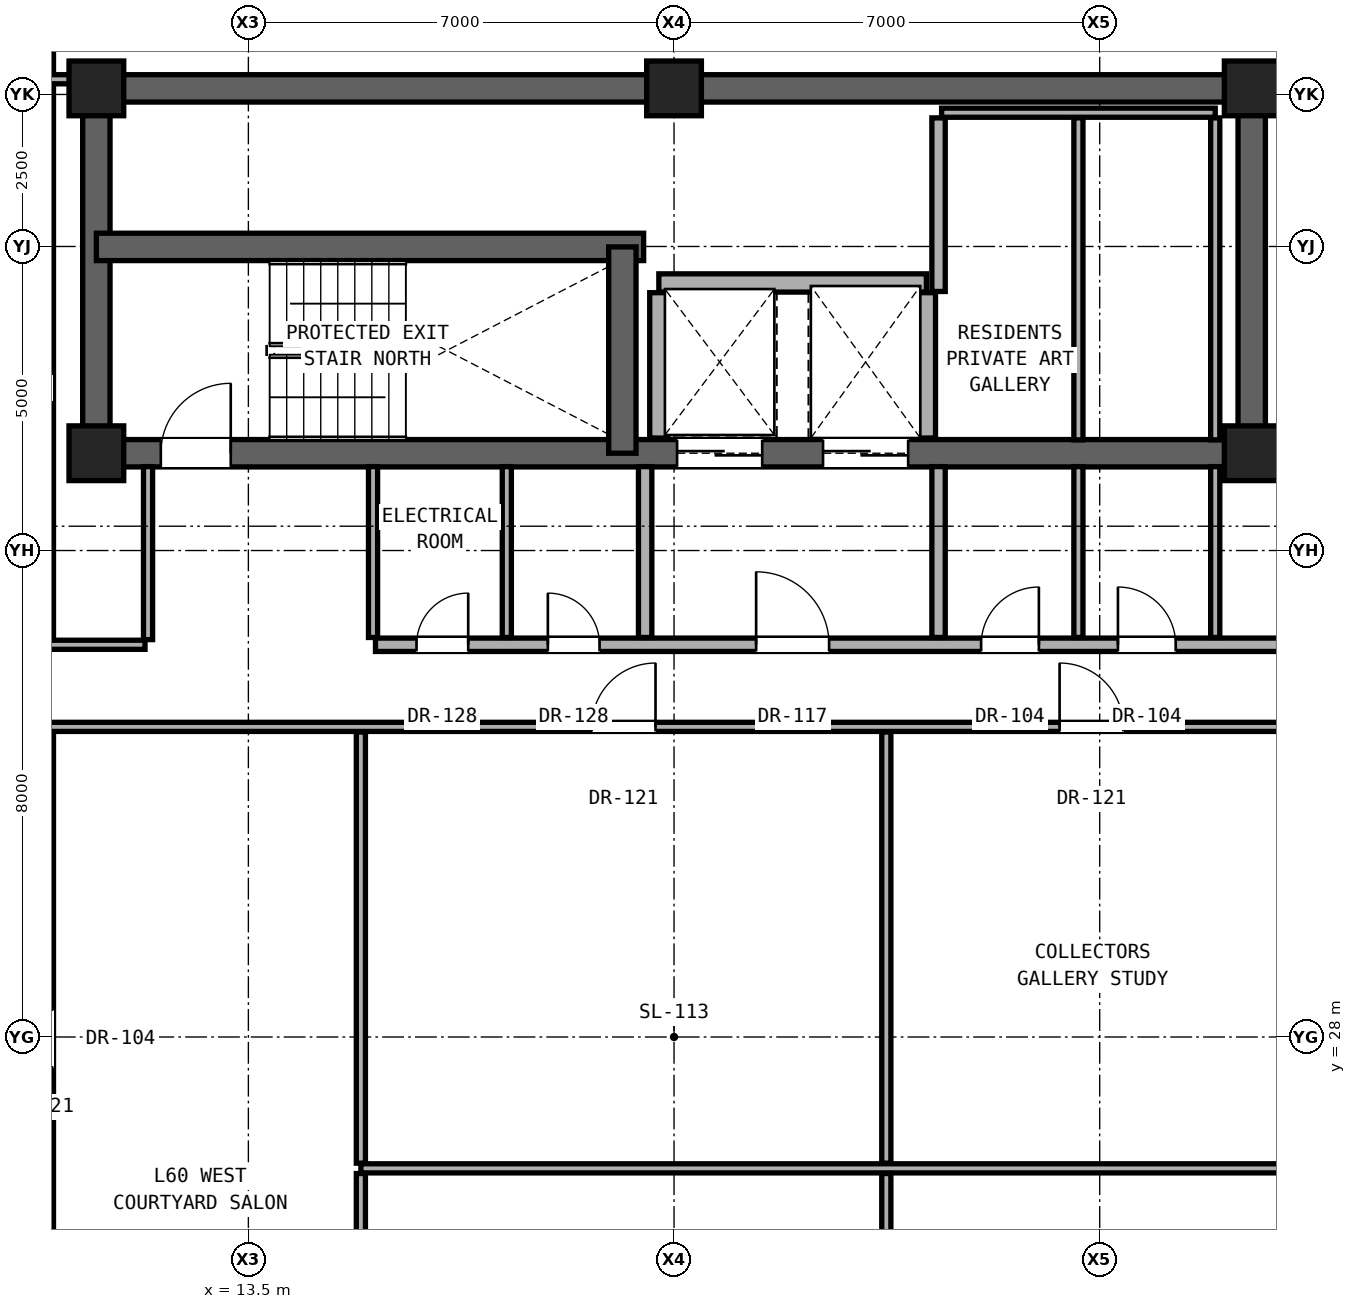
"""IFC4 building model, lengths in metres.
Left out: names, types, materials, properties, quantities, classifications, styles, units other than length and angle.
Written with IfcOpenShell. Run it as: python <this file> out.ifc"""

import sys

from ifc_helpers import new_model, si_unit, direction, frame, frame_2d, origin, origin_2d, place, context, subcontext, project, spatial, rectangle, extrude, element, fill, save


model = new_model("IFC4")
c1 = context("Model", 3, precision=1e-05, world=origin(), true_north=direction((0.0, 1.0)))
c2 = subcontext(c1, "Body", "Model", "MODEL_VIEW")
j1 = project(units=[si_unit("LENGTHUNIT", "METRE"), si_unit("PLANEANGLEUNIT", "RADIAN")], contexts=[c1])
p1 = place(None, origin())
s1 = spatial("IfcSite", under=j1, at=p1, CompositionType="ELEMENT")
p2 = place(p1, origin())
s2 = spatial("IfcBuilding", under=s1, at=p2, CompositionType="ELEMENT")
p3 = place(p2, frame((0.0, 0.0, 209.65)))
s3 = spatial("IfcBuildingStorey", under=s2, at=p3, CompositionType="ELEMENT", Elevation=209.65)
for number, where, z_axis, x_axis in (
    (1, (11.0, 37.6, 0.0), (0.0, 0.0, 1.0), (1.0, 0.0, 0.0)),
    (2, (30.0, 37.6, 0.0), (0.0, 0.0, 1.0), (1.0, 0.0, 0.0)),
    (3, (11.0, 43.6, 0.0), (0.0, 0.0, 1.0), (1.0, 0.0, 0.0)),
    (4, (20.5, 43.6, 0.0), (0.0, 0.0, 1.0), (1.0, 0.0, 0.0)),
    (5, (30.0, 43.6, 0.0), (0.0, 0.0, 1.0), (1.0, 0.0, 0.0)),
):
    element("IfcColumn", number, at=place(p3, frame(where, z_axis=z_axis, x_axis=x_axis)), inside=s3, PredefinedType="COLUMN", context=c2, shape_type="SweptSolid", body=[
        extrude(rectangle(XDim=0.9, YDim=0.9, at=origin_2d()), origin(), (0.0, 0.0, 1.0), 3.25),
    ])
p4 = place(p3, frame((11.0, 43.6, 0.0), z_axis=(0.0, 0.0, 1.0), x_axis=(1.0, 0.0, 0.0)))
e6 = element("IfcWall", 6, at=p4, inside=s3, PredefinedType="SHEAR", context=c2, shape_type="SweptSolid", body=[
    extrude(rectangle(XDim=19.0, YDim=0.45, at=frame_2d((9.5, 0.0))), origin(), (0.0, 0.0, 1.0), 2.89),
])
for number, where, z_axis, x_axis in (
    (7, (11.0, 37.6, 0.0), (0.0, 0.0, 1.0), (0.0, 1.0, 0.0)),
    (8, (30.0, 37.6, 0.0), (0.0, 0.0, 1.0), (0.0, 1.0, 0.0)),
):
    element("IfcWall", number, at=place(p3, frame(where, z_axis=z_axis, x_axis=x_axis)), inside=s3, PredefinedType="SHEAR", context=c2, shape_type="SweptSolid", body=[
        extrude(rectangle(XDim=6.0, YDim=0.45, at=frame_2d((3.0, 0.0))), origin(), (0.0, 0.0, 1.0), 2.89),
    ])
p5 = place(p3, frame((11.0, 37.6, 0.0), z_axis=(0.0, 0.0, 1.0), x_axis=(1.0, 0.0, 0.0)))
e9 = element("IfcWall", 9, at=p5, inside=s3, PredefinedType="SHEAR", context=c2, shape_type="SweptSolid", body=[
    extrude(rectangle(XDim=19.0, YDim=0.45, at=frame_2d((9.5, 0.0))), origin(), (0.0, 0.0, 1.0), 2.89),
])
p6 = place(p5, frame((1.06, 0.0, 0.0)))
e10 = element("IfcOpeningElement", 10, at=p6, cuts=e9, PredefinedType="OPENING", context=c2, shape_type="SweptSolid", body=[
    extrude(rectangle(XDim=1.15, YDim=2.2, at=frame_2d((0.575, 1.1))), frame((0.0, 0.235, 0.0), z_axis=(0.0, -1.0, 0.0), x_axis=(1.0, 0.0, 0.0)), (0.0, 0.0, 1.0), 0.47),
])
p7 = place(p5, frame((9.55, 0.0, 0.0)))
e11 = element("IfcOpeningElement", 11, at=p7, cuts=e9, PredefinedType="OPENING", context=c2, shape_type="SweptSolid", body=[
    extrude(rectangle(XDim=1.4, YDim=2.35, at=frame_2d((0.7, 1.175))), frame((0.0, 0.235, 0.0), z_axis=(0.0, -1.0, 0.0), x_axis=(1.0, 0.0, 0.0)), (0.0, 0.0, 1.0), 0.47),
])
p8 = place(p5, frame((11.95, 0.0, 0.0)))
e12 = element("IfcOpeningElement", 12, at=p8, cuts=e9, PredefinedType="OPENING", context=c2, shape_type="SweptSolid", body=[
    extrude(rectangle(XDim=1.4, YDim=2.35, at=frame_2d((0.7, 1.175))), frame((0.0, 0.235, 0.0), z_axis=(0.0, -1.0, 0.0), x_axis=(1.0, 0.0, 0.0)), (0.0, 0.0, 1.0), 0.47),
])
p9 = place(p3, frame((11.0, 40.993, 0.0), z_axis=(0.0, 0.0, 1.0), x_axis=(1.0, 0.0, 0.0)))
e13 = element("IfcWall", 13, at=p9, inside=s3, PredefinedType="SHEAR", context=c2, shape_type="SweptSolid", body=[
    extrude(rectangle(XDim=9.0, YDim=0.45, at=frame_2d((4.5, 0.0))), origin(), (0.0, 0.0, 1.0), 2.89),
])
p10 = place(p3, frame((19.65, 37.6, 0.0), z_axis=(0.0, 0.0, 1.0), x_axis=(0.0, 1.0, 0.0)))
e14 = element("IfcWall", 14, at=p10, inside=s3, PredefinedType="SHEAR", context=c2, shape_type="SweptSolid", body=[
    extrude(rectangle(XDim=3.393, YDim=0.45, at=frame_2d((1.696, 0.0))), origin(), (0.0, 0.0, 1.0), 2.89),
])
p11 = place(p3, frame((15.35, 25.84, 0.0), z_axis=(0.0, 0.0, 1.0), x_axis=(1.0, 0.0, 0.0)))
e15 = element("IfcWall", 15, at=p11, inside=s3, PredefinedType="PARTITIONING", context=c2, shape_type="SweptSolid", body=[
    extrude(rectangle(XDim=15.43, YDim=0.15, at=frame_2d((7.715, 0.0))), origin(), (0.0, 0.0, 1.0), 2.266),
])
p12 = place(p3, frame((10.22, 33.1, 0.0), z_axis=(0.0, 0.0, 1.0), x_axis=(1.0, 0.0, 0.0)))
e16 = element("IfcWall", 16, at=p12, inside=s3, PredefinedType="PARTITIONING", context=c2, shape_type="SweptSolid", body=[
    extrude(rectangle(XDim=20.56, YDim=0.15, at=frame_2d((10.28, 0.0))), origin(), (0.0, 0.0, 1.0), 2.266),
])
p13 = place(p12, frame((8.926, 0.0, 0.0)))
e17 = element("IfcOpeningElement", 17, at=p13, cuts=e16, PredefinedType="OPENING", context=c2, shape_type="SweptSolid", body=[
    extrude(rectangle(XDim=1.05, YDim=2.2, at=frame_2d((0.525, 1.1))), frame((0.0, 0.085, 0.0), z_axis=(0.0, -1.0, 0.0), x_axis=(1.0, 0.0, 0.0)), (0.0, 0.0, 1.0), 0.17),
])
p14 = place(p12, frame((16.621, 0.0, 0.0)))
e18 = element("IfcOpeningElement", 18, at=p14, cuts=e16, PredefinedType="OPENING", context=c2, shape_type="SweptSolid", body=[
    extrude(rectangle(XDim=1.05, YDim=2.2, at=frame_2d((0.525, 1.1))), frame((0.0, 0.085, 0.0), z_axis=(0.0, -1.0, 0.0), x_axis=(1.0, 0.0, 0.0)), (0.0, 0.0, 1.0), 0.17),
])
p15 = place(p3, frame((10.22, 34.45, 0.0), z_axis=(0.0, 0.0, 1.0), x_axis=(1.0, 0.0, 0.0)))
e19 = element("IfcWall", 19, at=p15, inside=s3, PredefinedType="PARTITIONING", context=c2, shape_type="SweptSolid", body=[
    extrude(rectangle(XDim=1.58, YDim=0.15, at=frame_2d((0.79, 0.0))), origin(), (0.0, 0.0, 1.0), 2.266),
])
p16 = place(p3, frame((15.59, 34.45, 0.0), z_axis=(0.0, 0.0, 1.0), x_axis=(1.0, 0.0, 0.0)))
e20 = element("IfcWall", 20, at=p16, inside=s3, PredefinedType="SOLIDWALL", context=c2, shape_type="SweptSolid", body=[
    extrude(rectangle(XDim=15.19, YDim=0.22, at=frame_2d((7.595, 0.0))), origin(), (0.0, 0.0, 1.0), 2.266),
])
p17 = place(p16, frame((6.26, 0.0, 0.0)))
e21 = element("IfcOpeningElement", 21, at=p17, cuts=e20, PredefinedType="OPENING", context=c2, shape_type="SweptSolid", body=[
    extrude(rectangle(XDim=1.2, YDim=2.25, at=frame_2d((0.6, 1.125))), frame((0.0, 0.12, 0.0), z_axis=(0.0, -1.0, 0.0), x_axis=(1.0, 0.0, 0.0)), (0.0, 0.0, 1.0), 0.24),
])
p18 = place(p16, frame((9.96, 0.0, 0.0)))
e22 = element("IfcOpeningElement", 22, at=p18, cuts=e20, PredefinedType="OPENING", context=c2, shape_type="SweptSolid", body=[
    extrude(rectangle(XDim=0.95, YDim=2.15, at=frame_2d((0.475, 1.075))), frame((0.0, 0.12, 0.0), z_axis=(0.0, -1.0, 0.0), x_axis=(1.0, 0.0, 0.0)), (0.0, 0.0, 1.0), 0.24),
])
p19 = place(p16, frame((12.21, 0.0, 0.0)))
e23 = element("IfcOpeningElement", 23, at=p19, cuts=e20, PredefinedType="OPENING", context=c2, shape_type="SweptSolid", body=[
    extrude(rectangle(XDim=0.95, YDim=2.15, at=frame_2d((0.475, 1.075))), frame((0.0, 0.12, 0.0), z_axis=(0.0, -1.0, 0.0), x_axis=(1.0, 0.0, 0.0)), (0.0, 0.0, 1.0), 0.24),
])
p20 = place(p16, frame((0.675, 0.0, 0.0)))
e24 = element("IfcOpeningElement", 24, at=p20, cuts=e20, PredefinedType="OPENING", context=c2, shape_type="SweptSolid", body=[
    extrude(rectangle(XDim=0.85, YDim=2.01, at=frame_2d((0.425, 1.005))), frame((0.0, 0.12, 0.0), z_axis=(0.0, -1.0, 0.0), x_axis=(1.0, 0.0, 0.0)), (0.0, 0.0, 1.0), 0.24),
])
p21 = place(p16, frame((2.835, 0.0, 0.0)))
e25 = element("IfcOpeningElement", 25, at=p21, cuts=e20, PredefinedType="OPENING", context=c2, shape_type="SweptSolid", body=[
    extrude(rectangle(XDim=0.85, YDim=2.01, at=frame_2d((0.425, 1.005))), frame((0.0, 0.12, 0.0), z_axis=(0.0, -1.0, 0.0), x_axis=(1.0, 0.0, 0.0)), (0.0, 0.0, 1.0), 0.24),
])
p22 = place(p3, frame((20.25, 40.4, 0.0), z_axis=(0.0, 0.0, 1.0), x_axis=(1.0, 0.0, 0.0)))
e26 = element("IfcWall", 26, at=p22, inside=s3, PredefinedType="SOLIDWALL", context=c2, shape_type="SweptSolid", body=[
    extrude(rectangle(XDim=4.4, YDim=0.3, at=frame_2d((2.2, 0.0))), origin(), (0.0, 0.0, 1.0), 2.89),
])
p23 = place(p3, frame((24.9, 43.2, 0.0), z_axis=(0.0, 0.0, 1.0), x_axis=(1.0, 0.0, 0.0)))
e27 = element("IfcWall", 27, at=p23, inside=s3, PredefinedType="PARTITIONING", context=c2, shape_type="SweptSolid", body=[
    extrude(rectangle(XDim=4.5, YDim=0.15, at=frame_2d((2.25, 0.0))), origin(), (0.0, 0.0, 1.0), 2.89),
])
for number, where, z_axis, x_axis in (
    (28, (10.22, 43.75, 0.0), (0.0, 0.0, 1.0), (1.0, 0.0, 0.0)),
    (29, (30.22, 43.75, 0.0), (0.0, 0.0, 1.0), (1.0, 0.0, 0.0)),
):
    element("IfcWall", number, at=place(p3, frame(where, z_axis=z_axis, x_axis=x_axis)), inside=s3, PredefinedType="PARTITIONING", context=c2, shape_type="SweptSolid", body=[
        extrude(rectangle(XDim=0.56, YDim=0.15, at=frame_2d((0.28, 0.0))), origin(), (0.0, 0.0, 1.0), 2.89),
    ])
p24 = place(p3, frame((10.22, 22.935, 0.0), z_axis=(0.0, 0.0, 1.0), x_axis=(0.0, 1.0, 0.0)))
e30 = element("IfcWall", 30, at=p24, inside=s3, PredefinedType="PARTITIONING", context=c2, shape_type="SweptSolid", body=[
    extrude(rectangle(XDim=10.08, YDim=0.15, at=frame_2d((5.04, 0.0))), origin(), (0.0, 0.0, 1.0), 2.266),
])
p25 = place(p24, frame((4.565, 0.0, 0.0)))
e31 = element("IfcOpeningElement", 31, at=p25, cuts=e30, PredefinedType="OPENING", context=c2, shape_type="SweptSolid", body=[
    extrude(rectangle(XDim=0.95, YDim=2.15, at=frame_2d((0.475, 1.075))), frame((0.0, 0.085, 0.0), z_axis=(0.0, -1.0, 0.0), x_axis=(1.0, 0.0, 0.0)), (0.0, 0.0, 1.0), 0.17),
])
p26 = place(p3, frame((10.22, 34.535, 0.0), z_axis=(0.0, 0.0, 1.0), x_axis=(0.0, 1.0, 0.0)))
e32 = element("IfcWall", 32, at=p26, inside=s3, PredefinedType="PARTITIONING", context=c2, shape_type="SweptSolid", body=[
    extrude(rectangle(XDim=9.13, YDim=0.15, at=frame_2d((4.565, 0.0))), origin(), (0.0, 0.0, 1.0), 2.282),
])
p27 = place(p3, frame((10.22, 43.835, 0.0), z_axis=(0.0, 0.0, 1.0), x_axis=(0.0, 1.0, 0.0)))
e33 = element("IfcWall", 33, at=p27, inside=s3, PredefinedType="PARTITIONING", context=c2, shape_type="SweptSolid", body=[
    extrude(rectangle(XDim=2.939, YDim=0.15, at=frame_2d((1.469, 0.0))), origin(), (0.0, 0.0, 1.0), 2.89),
])
p28 = place(p3, frame((11.85, 34.535, 0.0), z_axis=(0.0, 0.0, 1.0), x_axis=(0.0, 1.0, 0.0)))
e34 = element("IfcWall", 34, at=p28, inside=s3, PredefinedType="PARTITIONING", context=c2, shape_type="SweptSolid", body=[
    extrude(rectangle(XDim=2.845, YDim=0.15, at=frame_2d((1.422, 0.0))), origin(), (0.0, 0.0, 1.0), 2.89),
])
p29 = place(p3, frame((15.35, 22.935, 0.0), z_axis=(0.0, 0.0, 1.0), x_axis=(0.0, 1.0, 0.0)))
e35 = element("IfcWall", 35, at=p29, inside=s3, PredefinedType="PARTITIONING", context=c2, shape_type="SweptSolid", body=[
    extrude(rectangle(XDim=2.82, YDim=0.15, at=frame_2d((1.41, 0.0))), origin(), (0.0, 0.0, 1.0), 2.266),
])
p30 = place(p3, frame((15.35, 25.925, 0.0), z_axis=(0.0, 0.0, 1.0), x_axis=(0.0, 1.0, 0.0)))
e36 = element("IfcWall", 36, at=p30, inside=s3, PredefinedType="PARTITIONING", context=c2, shape_type="SweptSolid", body=[
    extrude(rectangle(XDim=7.09, YDim=0.15, at=frame_2d((3.545, 0.0))), origin(), (0.0, 0.0, 1.0), 2.266),
])
for number, where, z_axis, x_axis in (
    (37, (15.55, 34.57, 0.0), (0.0, 0.0, 1.0), (0.0, 1.0, 0.0)),
    (38, (17.75, 34.57, 0.0), (0.0, 0.0, 1.0), (0.0, 1.0, 0.0)),
):
    element("IfcWall", number, at=place(p3, frame(where, z_axis=z_axis, x_axis=x_axis)), inside=s3, PredefinedType="PARTITIONING", context=c2, shape_type="SweptSolid", body=[
        extrude(rectangle(XDim=2.81, YDim=0.15, at=frame_2d((1.405, 0.0))), origin(), (0.0, 0.0, 1.0), 2.89),
    ])
p31 = place(p3, frame((20.025, 34.57, 0.0), z_axis=(0.0, 0.0, 1.0), x_axis=(0.0, 1.0, 0.0)))
e39 = element("IfcWall", 39, at=p31, inside=s3, PredefinedType="SOLIDWALL", context=c2, shape_type="SweptSolid", body=[
    extrude(rectangle(XDim=2.81, YDim=0.22, at=frame_2d((1.405, 0.0))), origin(), (0.0, 0.0, 1.0), 2.89),
])
p32 = place(p3, frame((20.25, 37.85, 0.0), z_axis=(0.0, 0.0, 1.0), x_axis=(0.0, 1.0, 0.0)))
e40 = element("IfcWall", 40, at=p32, inside=s3, PredefinedType="SOLIDWALL", context=c2, shape_type="SweptSolid", body=[
    extrude(rectangle(XDim=2.39, YDim=0.3, at=frame_2d((1.195, 0.0))), origin(), (0.0, 0.0, 1.0), 2.89),
])
p33 = place(p3, frame((23.991, 19.985, 0.0), z_axis=(0.0, 0.0, 1.0), x_axis=(0.0, 1.0, 0.0)))
e41 = element("IfcWall", 41, at=p33, inside=s3, PredefinedType="PARTITIONING", context=c2, shape_type="SweptSolid", body=[
    extrude(rectangle(XDim=5.77, YDim=0.15, at=frame_2d((2.885, 0.0))), origin(), (0.0, 0.0, 1.0), 2.266),
])
p34 = place(p3, frame((23.991, 25.925, 0.0), z_axis=(0.0, 0.0, 1.0), x_axis=(0.0, 1.0, 0.0)))
e42 = element("IfcWall", 42, at=p34, inside=s3, PredefinedType="PARTITIONING", context=c2, shape_type="SweptSolid", body=[
    extrude(rectangle(XDim=7.09, YDim=0.15, at=frame_2d((3.545, 0.0))), origin(), (0.0, 0.0, 1.0), 2.266),
])
p35 = place(p3, frame((24.65, 37.85, 0.0), z_axis=(0.0, 0.0, 1.0), x_axis=(0.0, 1.0, 0.0)))
e43 = element("IfcWall", 43, at=p35, inside=s3, PredefinedType="SOLIDWALL", context=c2, shape_type="SweptSolid", body=[
    extrude(rectangle(XDim=2.39, YDim=0.3, at=frame_2d((1.195, 0.0))), origin(), (0.0, 0.0, 1.0), 2.89),
])
p36 = place(p3, frame((24.85, 34.57, 0.0), z_axis=(0.0, 0.0, 1.0), x_axis=(0.0, 1.0, 0.0)))
e44 = element("IfcWall", 44, at=p36, inside=s3, PredefinedType="SOLIDWALL", context=c2, shape_type="SweptSolid", body=[
    extrude(rectangle(XDim=2.81, YDim=0.22, at=frame_2d((1.405, 0.0))), origin(), (0.0, 0.0, 1.0), 2.89),
])
p37 = place(p3, frame((24.85, 40.26, 0.0), z_axis=(0.0, 0.0, 1.0), x_axis=(0.0, 1.0, 0.0)))
e45 = element("IfcWall", 45, at=p37, inside=s3, PredefinedType="SOLIDWALL", context=c2, shape_type="SweptSolid", body=[
    extrude(rectangle(XDim=2.855, YDim=0.22, at=frame_2d((1.427, 0.0))), origin(), (0.0, 0.0, 1.0), 2.89),
])
p38 = place(p3, frame((27.15, 34.57, 0.0), z_axis=(0.0, 0.0, 1.0), x_axis=(0.0, 1.0, 0.0)))
e46 = element("IfcWall", 46, at=p38, inside=s3, PredefinedType="PARTITIONING", context=c2, shape_type="SweptSolid", body=[
    extrude(rectangle(XDim=2.81, YDim=0.15, at=frame_2d((1.405, 0.0))), origin(), (0.0, 0.0, 1.0), 2.89),
])
p39 = place(p3, frame((27.15, 37.82, 0.0), z_axis=(0.0, 0.0, 1.0), x_axis=(0.0, 1.0, 0.0)))
e47 = element("IfcWall", 47, at=p39, inside=s3, PredefinedType="PARTITIONING", context=c2, shape_type="SweptSolid", body=[
    extrude(rectangle(XDim=5.295, YDim=0.15, at=frame_2d((2.647, 0.0))), origin(), (0.0, 0.0, 1.0), 2.89),
])
p40 = place(p3, frame((29.4, 34.57, 0.0), z_axis=(0.0, 0.0, 1.0), x_axis=(0.0, 1.0, 0.0)))
e48 = element("IfcWall", 48, at=p40, inside=s3, PredefinedType="PARTITIONING", context=c2, shape_type="SweptSolid", body=[
    extrude(rectangle(XDim=2.81, YDim=0.15, at=frame_2d((1.405, 0.0))), origin(), (0.0, 0.0, 1.0), 2.89),
])
p41 = place(p3, frame((29.4, 37.82, 0.0), z_axis=(0.0, 0.0, 1.0), x_axis=(0.0, 1.0, 0.0)))
e49 = element("IfcWall", 49, at=p41, inside=s3, PredefinedType="PARTITIONING", context=c2, shape_type="SweptSolid", body=[
    extrude(rectangle(XDim=5.295, YDim=0.15, at=frame_2d((2.647, 0.0))), origin(), (0.0, 0.0, 1.0), 2.89),
])
p42 = place(p6, origin())
e50 = element("IfcDoor", 50, at=p42, inside=s3, OperationType="SINGLE_SWING_RIGHT", PredefinedType="DOOR", context=c2, shape_type="SweptSolid", body=[
    extrude(rectangle(XDim=1.15, YDim=2.2, at=frame_2d((0.575, 1.1))), frame((0.0, 0.025, 0.0), z_axis=(0.0, -1.0, 0.0), x_axis=(1.0, 0.0, 0.0)), (0.0, 0.0, 1.0), 0.05),
])
fill(e10, e50)
p43 = place(p17, origin())
e51 = element("IfcDoor", 51, at=p43, inside=s3, OperationType="SINGLE_SWING_LEFT", PredefinedType="DOOR", context=c2, shape_type="SweptSolid", body=[
    extrude(rectangle(XDim=1.2, YDim=2.25, at=frame_2d((0.6, 1.125))), frame((0.0, 0.025, 0.0), z_axis=(0.0, -1.0, 0.0), x_axis=(1.0, 0.0, 0.0)), (0.0, 0.0, 1.0), 0.05),
])
fill(e21, e51)
p44 = place(p18, origin())
e52 = element("IfcDoor", 52, at=p44, inside=s3, OperationType="SINGLE_SWING_RIGHT", PredefinedType="DOOR", context=c2, shape_type="SweptSolid", body=[
    extrude(rectangle(XDim=0.95, YDim=2.15, at=frame_2d((0.475, 1.075))), frame((0.0, 0.025, 0.0), z_axis=(0.0, -1.0, 0.0), x_axis=(1.0, 0.0, 0.0)), (0.0, 0.0, 1.0), 0.05),
])
fill(e22, e52)
p45 = place(p19, origin())
e53 = element("IfcDoor", 53, at=p45, inside=s3, OperationType="SINGLE_SWING_LEFT", PredefinedType="DOOR", context=c2, shape_type="SweptSolid", body=[
    extrude(rectangle(XDim=0.95, YDim=2.15, at=frame_2d((0.475, 1.075))), frame((0.0, 0.025, 0.0), z_axis=(0.0, -1.0, 0.0), x_axis=(1.0, 0.0, 0.0)), (0.0, 0.0, 1.0), 0.05),
])
fill(e23, e53)
p46 = place(p20, origin())
e54 = element("IfcDoor", 54, at=p46, inside=s3, OperationType="SINGLE_SWING_RIGHT", PredefinedType="DOOR", context=c2, shape_type="SweptSolid", body=[
    extrude(rectangle(XDim=0.85, YDim=2.01, at=frame_2d((0.425, 1.005))), frame((0.0, 0.025, 0.0), z_axis=(0.0, -1.0, 0.0), x_axis=(1.0, 0.0, 0.0)), (0.0, 0.0, 1.0), 0.05),
])
fill(e24, e54)
p47 = place(p21, origin())
e55 = element("IfcDoor", 55, at=p47, inside=s3, OperationType="SINGLE_SWING_LEFT", PredefinedType="DOOR", context=c2, shape_type="SweptSolid", body=[
    extrude(rectangle(XDim=0.85, YDim=2.01, at=frame_2d((0.425, 1.005))), frame((0.0, 0.025, 0.0), z_axis=(0.0, -1.0, 0.0), x_axis=(1.0, 0.0, 0.0)), (0.0, 0.0, 1.0), 0.05),
])
fill(e25, e55)
p48 = place(p13, origin())
e56 = element("IfcDoor", 56, at=p48, inside=s3, OperationType="SINGLE_SWING_RIGHT", PredefinedType="DOOR", context=c2, shape_type="SweptSolid", body=[
    extrude(rectangle(XDim=1.05, YDim=2.2, at=frame_2d((0.525, 1.1))), frame((0.0, 0.025, 0.0), z_axis=(0.0, -1.0, 0.0), x_axis=(1.0, 0.0, 0.0)), (0.0, 0.0, 1.0), 0.05),
])
fill(e17, e56)
p49 = place(p14, origin())
e57 = element("IfcDoor", 57, at=p49, inside=s3, OperationType="SINGLE_SWING_LEFT", PredefinedType="DOOR", context=c2, shape_type="SweptSolid", body=[
    extrude(rectangle(XDim=1.05, YDim=2.2, at=frame_2d((0.525, 1.1))), frame((0.0, 0.025, 0.0), z_axis=(0.0, -1.0, 0.0), x_axis=(1.0, 0.0, 0.0)), (0.0, 0.0, 1.0), 0.05),
])
fill(e18, e57)
p50 = place(p7, origin())
e58 = element("IfcDoor", 58, at=p50, inside=s3, OperationType="DOUBLE_DOOR_SLIDING", PredefinedType="DOOR", context=c2, shape_type="SweptSolid", body=[
    extrude(rectangle(XDim=1.4, YDim=2.35, at=frame_2d((0.7, 1.175))), frame((0.0, 0.025, 0.0), z_axis=(0.0, -1.0, 0.0), x_axis=(1.0, 0.0, 0.0)), (0.0, 0.0, 1.0), 0.05),
])
fill(e11, e58)
p51 = place(p8, origin())
e59 = element("IfcDoor", 59, at=p51, inside=s3, OperationType="DOUBLE_DOOR_SLIDING", PredefinedType="DOOR", context=c2, shape_type="SweptSolid", body=[
    extrude(rectangle(XDim=1.4, YDim=2.35, at=frame_2d((0.7, 1.175))), frame((0.0, 0.025, 0.0), z_axis=(0.0, -1.0, 0.0), x_axis=(1.0, 0.0, 0.0)), (0.0, 0.0, 1.0), 0.05),
])
fill(e12, e59)
save(model, sys.argv[1])
